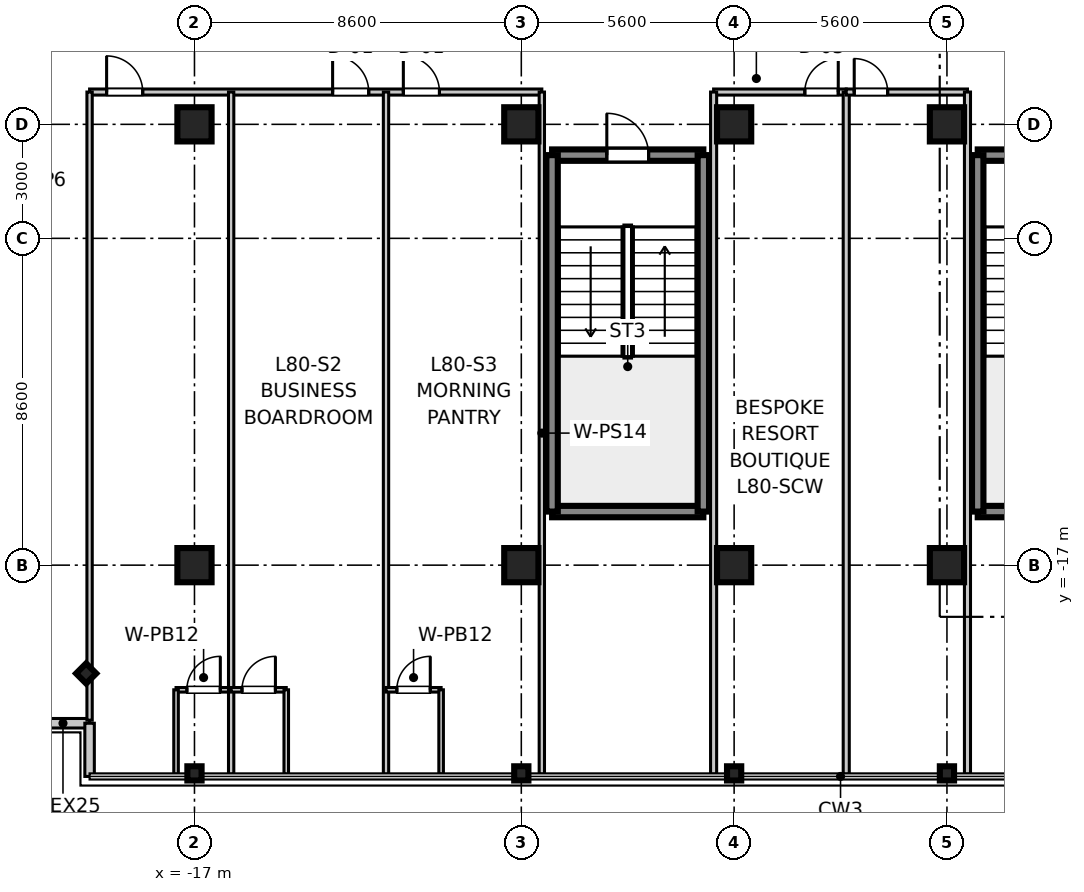
"""IFC4 building model, lengths in metres.
Left out: names, types, materials, properties, quantities, classifications, styles, units other than length and angle.
Written with IfcOpenShell. Run it as: python <this file> out.ifc"""

import sys

from ifc_helpers import new_model, si_unit, direction, frame, frame_2d, origin, origin_2d, place, context, subcontext, project, spatial, rectangle, i_section, extrude, source, transform, mapped, element, fill, save


model = new_model("IFC4")
c1 = context("Model", 3, precision=1e-05, world=origin(), true_north=direction((0.0, 1.0)))
c2 = subcontext(c1, "Body", "Model", "MODEL_VIEW")
j1 = project(units=[si_unit("LENGTHUNIT", "METRE"), si_unit("PLANEANGLEUNIT", "RADIAN")], contexts=[c1])
p1 = place(None, origin())
s1 = spatial("IfcSite", under=j1, at=p1, CompositionType="ELEMENT")
p2 = place(p1, origin())
s2 = spatial("IfcBuilding", under=s1, at=p2, CompositionType="ELEMENT")
p3 = place(p2, frame((0.0, 0.0, 311.9)))
s3 = spatial("IfcBuildingStorey", under=s2, at=p3, CompositionType="ELEMENT", Elevation=311.9)
m1 = source(origin(), c2, "Body", "SweptSolid", [
    extrude(rectangle(XDim=0.9, YDim=0.9, at=origin_2d()), origin(), (0.0, 0.0, 1.0), 3.805),
])
for number, where, z_axis, x_axis in (
    (1, (-17.0, -17.0, 0.0), (0.0, 0.0, 1.0), (1.0, 0.0, 0.0)),
    (2, (-17.0, -5.4, 0.0), (0.0, 0.0, 1.0), (1.0, 0.0, 0.0)),
    (3, (-8.4, -17.0, 0.0), (0.0, 0.0, 1.0), (1.0, 0.0, 0.0)),
    (4, (-8.4, -5.4, 0.0), (0.0, 0.0, 1.0), (1.0, 0.0, 0.0)),
    (5, (-2.8, -17.0, 0.0), (0.0, 0.0, 1.0), (1.0, 0.0, 0.0)),
    (6, (-2.8, -5.4, 0.0), (0.0, 0.0, 1.0), (1.0, 0.0, 0.0)),
    (7, (2.8, -17.0, 0.0), (0.0, 0.0, 1.0), (1.0, 0.0, 0.0)),
    (8, (2.8, -5.4, 0.0), (0.0, 0.0, 1.0), (1.0, 0.0, 0.0)),
):
    element("IfcColumn", number, at=place(p3, frame(where, z_axis=z_axis, x_axis=x_axis)), inside=s3, PredefinedType="COLUMN", context=c2, shape_type="MappedRepresentation", body=[
        mapped(m1, transform((0.0, 0.0, 0.0), scale=1.0)),
    ])
m2 = source(origin(), c2, "Body", "SweptSolid", [
    extrude(i_section(OverallWidth=0.374, OverallDepth=0.374, WebThickness=0.014, FlangeThickness=0.023, at=origin_2d()), origin(), (0.0, 0.0, 1.0), 3.805),
])
for number, where, z_axis, x_axis in (
    (9, (-17.0, -22.48, 0.0), (0.0, 0.0, 1.0), (0.0, 1.0, 0.0)),
    (10, (-8.4, -22.48, 0.0), (0.0, 0.0, 1.0), (0.0, 1.0, 0.0)),
    (11, (-2.8, -22.48, 0.0), (0.0, 0.0, 1.0), (0.0, 1.0, 0.0)),
    (12, (2.8, -22.48, 0.0), (0.0, 0.0, 1.0), (0.0, 1.0, 0.0)),
    (13, (-19.85, -19.85, 0.0), (0.0, 0.0, 1.0), (0.707, 0.707, 0.0)),
):
    element("IfcColumn", number, at=place(p3, frame(where, z_axis=z_axis, x_axis=x_axis)), inside=s3, PredefinedType="COLUMN", context=c2, shape_type="MappedRepresentation", body=[
        mapped(m2, transform((0.0, 0.0, 0.0), scale=1.0)),
    ])
m3 = source(origin(), c2, "Body", "SweptSolid", [
    extrude(rectangle(XDim=3.98, YDim=0.3, at=frame_2d((1.99, 0.0))), origin(), (0.0, 0.0, 1.0), 3.55),
])
for number, where, z_axis, x_axis in (
    (14, (3.61, -15.59, 0.0), (0.0, 0.0, 1.0), (1.0, 0.0, 0.0)),
    (15, (3.61, -6.21, 0.0), (0.0, 0.0, 1.0), (1.0, 0.0, 0.0)),
):
    element("IfcWall", number, at=place(p3, frame(where, z_axis=z_axis, x_axis=x_axis)), inside=s3, PredefinedType="SHEAR", context=c2, shape_type="MappedRepresentation", body=[
        mapped(m3, transform((0.0, 0.0, 0.0), scale=1.0)),
    ])
m4 = source(origin(), c2, "Body", "SweptSolid", [
    extrude(rectangle(XDim=9.38, YDim=0.3, at=frame_2d((4.69, 0.0))), origin(), (0.0, 0.0, 1.0), 3.55),
])
p4 = place(p3, frame((3.61, -15.59, 0.0), z_axis=(0.0, 0.0, 1.0), x_axis=(0.0, 1.0, 0.0)))
e16 = element("IfcWall", 16, at=p4, inside=s3, PredefinedType="SHEAR", context=c2, shape_type="MappedRepresentation", body=[
    mapped(m4, transform((0.0, 0.0, 0.0), scale=1.0)),
])
p5 = place(p3, frame((-7.59, -15.59, 0.0), z_axis=(0.0, 0.0, 1.0), x_axis=(1.0, 0.0, 0.0)))
e17 = element("IfcWall", 17, at=p5, inside=s3, PredefinedType="SHEAR", context=c2, shape_type="MappedRepresentation", body=[
    mapped(m3, transform((0.0, 0.0, 0.0), scale=1.0)),
])
p6 = place(p3, frame((-7.59, -6.21, 0.0), z_axis=(0.0, 0.0, 1.0), x_axis=(1.0, 0.0, 0.0)))
e18 = element("IfcWall", 18, at=p6, inside=s3, PredefinedType="SHEAR", context=c2, shape_type="MappedRepresentation", body=[
    mapped(m3, transform((0.0, 0.0, 0.0), scale=1.0)),
])
p7 = place(p6, frame((1.44, 0.0, 0.0)))
e19 = element("IfcOpeningElement", 19, at=p7, cuts=e18, PredefinedType="OPENING", context=c2, shape_type="SweptSolid", body=[
    extrude(rectangle(XDim=1.1, YDim=2.15, at=frame_2d((0.55, 1.075))), frame((0.0, 0.16, 0.0), z_axis=(0.0, -1.0, 0.0), x_axis=(1.0, 0.0, 0.0)), (0.0, 0.0, 1.0), 0.32),
])
for number, where, z_axis, x_axis in (
    (20, (-7.59, -15.59, 0.0), (0.0, 0.0, 1.0), (0.0, 1.0, 0.0)),
    (21, (-3.61, -15.59, 0.0), (0.0, 0.0, 1.0), (0.0, 1.0, 0.0)),
):
    element("IfcWall", number, at=place(p3, frame(where, z_axis=z_axis, x_axis=x_axis)), inside=s3, PredefinedType="SHEAR", context=c2, shape_type="MappedRepresentation", body=[
        mapped(m4, transform((0.0, 0.0, 0.0), scale=1.0)),
    ])
m5 = source(origin(), c2, "Body", "SweptSolid", [
    extrude(rectangle(XDim=1.4, YDim=0.25, at=frame_2d((0.7, 0.0))), origin(), (0.0, 0.0, 1.0), 3.55),
])
p8 = place(p3, frame((-21.16, -21.16, 0.0), z_axis=(0.0, 0.0, 1.0), x_axis=(1.0, 0.0, 0.0)))
e22 = element("IfcWall", 22, at=p8, inside=s3, PredefinedType="STANDARD", context=c2, shape_type="MappedRepresentation", body=[
    mapped(m5, transform((0.0, 0.0, 0.0), scale=1.0)),
])
m6 = source(origin(), c2, "Body", "SweptSolid", [
    extrude(rectangle(XDim=1.4, YDim=0.25, at=frame_2d((0.7, 0.0))), origin(), (0.0, 0.0, 1.0), 3.55),
])
p9 = place(p3, frame((-19.76, -22.56, 0.0), z_axis=(0.0, 0.0, 1.0), x_axis=(0.0, 1.0, 0.0)))
e23 = element("IfcWall", 23, at=p9, inside=s3, PredefinedType="STANDARD", context=c2, shape_type="MappedRepresentation", body=[
    mapped(m6, transform((0.0, 0.0, 0.0), scale=1.0)),
])
m7 = source(origin(), c2, "Body", "SweptSolid", [
    extrude(rectangle(XDim=11.9, YDim=0.16, at=frame_2d((5.95, 0.0))), origin(), (0.0, 0.0, 1.0), 2.89),
])
p10 = place(p3, frame((-19.76, -4.55, 0.0), z_axis=(0.0, 0.0, 1.0), x_axis=(1.0, 0.0, 0.0)))
e24 = element("IfcWall", 24, at=p10, inside=s3, PredefinedType="PARTITIONING", context=c2, shape_type="MappedRepresentation", body=[
    mapped(m7, transform((0.0, 0.0, 0.0), scale=1.0)),
])
p11 = place(p10, frame((0.448, 0.0, 0.0)))
e25 = element("IfcOpeningElement", 25, at=p11, cuts=e24, PredefinedType="OPENING", context=c2, shape_type="SweptSolid", body=[
    extrude(rectangle(XDim=0.95, YDim=2.1, at=frame_2d((0.475, 1.05))), frame((0.0, 0.09, 0.0), z_axis=(0.0, -1.0, 0.0), x_axis=(1.0, 0.0, 0.0)), (0.0, 0.0, 1.0), 0.18),
])
p12 = place(p10, frame((6.395, 0.0, 0.0)))
e26 = element("IfcOpeningElement", 26, at=p12, cuts=e24, PredefinedType="OPENING", context=c2, shape_type="SweptSolid", body=[
    extrude(rectangle(XDim=0.95, YDim=2.1, at=frame_2d((0.475, 1.05))), frame((0.0, 0.09, 0.0), z_axis=(0.0, -1.0, 0.0), x_axis=(1.0, 0.0, 0.0)), (0.0, 0.0, 1.0), 0.18),
])
p13 = place(p10, frame((8.256, 0.0, 0.0)))
e27 = element("IfcOpeningElement", 27, at=p13, cuts=e24, PredefinedType="OPENING", context=c2, shape_type="SweptSolid", body=[
    extrude(rectangle(XDim=0.95, YDim=2.1, at=frame_2d((0.475, 1.05))), frame((0.0, 0.09, 0.0), z_axis=(0.0, -1.0, 0.0), x_axis=(1.0, 0.0, 0.0)), (0.0, 0.0, 1.0), 0.18),
])
m8 = source(origin(), c2, "Body", "SweptSolid", [
    extrude(rectangle(XDim=16.53, YDim=0.14, at=frame_2d((8.265, 0.0))), origin(), (0.0, 0.0, 1.0), 2.89),
])
p14 = place(p3, frame((-19.76, -21.08, 0.0), z_axis=(0.0, 0.0, 1.0), x_axis=(0.0, 1.0, 0.0)))
e28 = element("IfcWall", 28, at=p14, inside=s3, PredefinedType="PARTITIONING", context=c2, shape_type="MappedRepresentation", body=[
    mapped(m8, transform((0.0, 0.0, 0.0), scale=1.0)),
])
m9 = source(origin(), c2, "Body", "SweptSolid", [
    extrude(rectangle(XDim=17.95, YDim=0.14, at=frame_2d((8.975, 0.0))), origin(), (0.0, 0.0, 1.0), 2.89),
])
p15 = place(p3, frame((-7.86, -22.5, 0.0), z_axis=(0.0, 0.0, 1.0), x_axis=(0.0, 1.0, 0.0)))
e29 = element("IfcWall", 29, at=p15, inside=s3, PredefinedType="PARTITIONING", context=c2, shape_type="MappedRepresentation", body=[
    mapped(m9, transform((0.0, 0.0, 0.0), scale=1.0)),
])
m10 = source(origin(), c2, "Body", "SweptSolid", [
    extrude(rectangle(XDim=1.45, YDim=0.12, at=frame_2d((0.725, 0.0))), origin(), (0.0, 0.0, 1.0), 2.89),
])
p16 = place(p3, frame((-17.485, -20.28, 0.0), z_axis=(0.0, 0.0, 1.0), x_axis=(1.0, 0.0, 0.0)))
e30 = element("IfcWall", 30, at=p16, inside=s3, PredefinedType="PARTITIONING", context=c2, shape_type="MappedRepresentation", body=[
    mapped(m10, transform((0.0, 0.0, 0.0), scale=1.0)),
])
p17 = place(p16, frame((0.285, 0.0, 0.0)))
e31 = element("IfcOpeningElement", 31, at=p17, cuts=e30, PredefinedType="OPENING", context=c2, shape_type="SweptSolid", body=[
    extrude(rectangle(XDim=0.88, YDim=2.1, at=frame_2d((0.44, 1.05))), frame((0.0, 0.07, 0.0), z_axis=(0.0, -1.0, 0.0), x_axis=(1.0, 0.0, 0.0)), (0.0, 0.0, 1.0), 0.14),
])
m11 = source(origin(), c2, "Body", "SweptSolid", [
    extrude(rectangle(XDim=2.22, YDim=0.12, at=frame_2d((1.11, 0.0))), origin(), (0.0, 0.0, 1.0), 2.89),
])
p18 = place(p3, frame((-17.485, -22.5, 0.0), z_axis=(0.0, 0.0, 1.0), x_axis=(0.0, 1.0, 0.0)))
e32 = element("IfcWall", 32, at=p18, inside=s3, PredefinedType="PARTITIONING", context=c2, shape_type="MappedRepresentation", body=[
    mapped(m11, transform((0.0, 0.0, 0.0), scale=1.0)),
])
p19 = place(p3, frame((-16.035, -22.5, 0.0), z_axis=(0.0, 0.0, 1.0), x_axis=(0.0, 1.0, 0.0)))
e33 = element("IfcWall", 33, at=p19, inside=s3, PredefinedType="PARTITIONING", context=c2, shape_type="MappedRepresentation", body=[
    mapped(m9, transform((0.0, 0.0, 0.0), scale=1.0)),
])
m12 = source(origin(), c2, "Body", "SweptSolid", [
    extrude(rectangle(XDim=1.45, YDim=0.12, at=frame_2d((0.725, 0.0))), origin(), (0.0, 0.0, 1.0), 2.89),
])
p20 = place(p3, frame((-16.035, -20.28, 0.0), z_axis=(0.0, 0.0, 1.0), x_axis=(1.0, 0.0, 0.0)))
e34 = element("IfcWall", 34, at=p20, inside=s3, PredefinedType="PARTITIONING", context=c2, shape_type="MappedRepresentation", body=[
    mapped(m12, transform((0.0, 0.0, 0.0), scale=1.0)),
])
p21 = place(p20, frame((0.285, 0.0, 0.0)))
e35 = element("IfcOpeningElement", 35, at=p21, cuts=e34, PredefinedType="OPENING", context=c2, shape_type="SweptSolid", body=[
    extrude(rectangle(XDim=0.88, YDim=2.1, at=frame_2d((0.44, 1.05))), frame((0.0, 0.07, 0.0), z_axis=(0.0, -1.0, 0.0), x_axis=(1.0, 0.0, 0.0)), (0.0, 0.0, 1.0), 0.14),
])
p22 = place(p3, frame((-14.585, -22.5, 0.0), z_axis=(0.0, 0.0, 1.0), x_axis=(0.0, 1.0, 0.0)))
e36 = element("IfcWall", 36, at=p22, inside=s3, PredefinedType="PARTITIONING", context=c2, shape_type="MappedRepresentation", body=[
    mapped(m11, transform((0.0, 0.0, 0.0), scale=1.0)),
])
p23 = place(p3, frame((-11.96, -22.5, 0.0), z_axis=(0.0, 0.0, 1.0), x_axis=(0.0, 1.0, 0.0)))
e37 = element("IfcWall", 37, at=p23, inside=s3, PredefinedType="PARTITIONING", context=c2, shape_type="MappedRepresentation", body=[
    mapped(m9, transform((0.0, 0.0, 0.0), scale=1.0)),
])
p24 = place(p3, frame((-11.96, -20.28, 0.0), z_axis=(0.0, 0.0, 1.0), x_axis=(1.0, 0.0, 0.0)))
e38 = element("IfcWall", 38, at=p24, inside=s3, PredefinedType="PARTITIONING", context=c2, shape_type="MappedRepresentation", body=[
    mapped(m12, transform((0.0, 0.0, 0.0), scale=1.0)),
])
p25 = place(p24, frame((0.285, 0.0, 0.0)))
e39 = element("IfcOpeningElement", 39, at=p25, cuts=e38, PredefinedType="OPENING", context=c2, shape_type="SweptSolid", body=[
    extrude(rectangle(XDim=0.88, YDim=2.1, at=frame_2d((0.44, 1.05))), frame((0.0, 0.07, 0.0), z_axis=(0.0, -1.0, 0.0), x_axis=(1.0, 0.0, 0.0)), (0.0, 0.0, 1.0), 0.14),
])
p26 = place(p3, frame((-10.51, -22.5, 0.0), z_axis=(0.0, 0.0, 1.0), x_axis=(0.0, 1.0, 0.0)))
e40 = element("IfcWall", 40, at=p26, inside=s3, PredefinedType="PARTITIONING", context=c2, shape_type="MappedRepresentation", body=[
    mapped(m11, transform((0.0, 0.0, 0.0), scale=1.0)),
])
m13 = source(origin(), c2, "Body", "SweptSolid", [
    extrude(rectangle(XDim=3.49, YDim=0.16, at=frame_2d((1.745, 0.0))), origin(), (0.0, 0.0, 1.0), 2.89),
])
p27 = place(p3, frame((-3.34, -4.55, 0.0), z_axis=(0.0, 0.0, 1.0), x_axis=(1.0, 0.0, 0.0)))
e41 = element("IfcWall", 41, at=p27, inside=s3, PredefinedType="PARTITIONING", context=c2, shape_type="MappedRepresentation", body=[
    mapped(m13, transform((0.0, 0.0, 0.0), scale=1.0)),
])
p28 = place(p27, frame((2.4, 0.0, 0.0)))
e42 = element("IfcOpeningElement", 42, at=p28, cuts=e41, PredefinedType="OPENING", context=c2, shape_type="SweptSolid", body=[
    extrude(rectangle(XDim=0.88, YDim=2.1, at=frame_2d((0.44, 1.05))), frame((0.0, 0.09, 0.0), z_axis=(0.0, -1.0, 0.0), x_axis=(1.0, 0.0, 0.0)), (0.0, 0.0, 1.0), 0.18),
])
m14 = source(origin(), c2, "Body", "SweptSolid", [
    extrude(rectangle(XDim=17.95, YDim=0.16, at=frame_2d((8.975, 0.0))), origin(), (0.0, 0.0, 1.0), 2.89),
])
for number, where, z_axis, x_axis in (
    (43, (-3.34, -22.5, 0.0), (0.0, 0.0, 1.0), (0.0, 1.0, 0.0)),
    (44, (0.15, -22.5, 0.0), (0.0, 0.0, 1.0), (0.0, 1.0, 0.0)),
):
    element("IfcWall", number, at=place(p3, frame(where, z_axis=z_axis, x_axis=x_axis)), inside=s3, PredefinedType="PARTITIONING", context=c2, shape_type="MappedRepresentation", body=[
        mapped(m14, transform((0.0, 0.0, 0.0), scale=1.0)),
    ])
m15 = source(origin(), c2, "Body", "SweptSolid", [
    extrude(rectangle(XDim=3.19, YDim=0.16, at=frame_2d((1.595, 0.0))), origin(), (0.0, 0.0, 1.0), 2.89),
])
p29 = place(p3, frame((0.15, -4.55, 0.0), z_axis=(0.0, 0.0, 1.0), x_axis=(1.0, 0.0, 0.0)))
e45 = element("IfcWall", 45, at=p29, inside=s3, PredefinedType="PARTITIONING", context=c2, shape_type="MappedRepresentation", body=[
    mapped(m15, transform((0.0, 0.0, 0.0), scale=1.0)),
])
p30 = place(p29, frame((0.21, 0.0, 0.0)))
e46 = element("IfcOpeningElement", 46, at=p30, cuts=e45, PredefinedType="OPENING", context=c2, shape_type="SweptSolid", body=[
    extrude(rectangle(XDim=0.88, YDim=2.1, at=frame_2d((0.44, 1.05))), frame((0.0, 0.09, 0.0), z_axis=(0.0, -1.0, 0.0), x_axis=(1.0, 0.0, 0.0)), (0.0, 0.0, 1.0), 0.18),
])
p31 = place(p3, frame((3.34, -22.5, 0.0), z_axis=(0.0, 0.0, 1.0), x_axis=(0.0, 1.0, 0.0)))
e47 = element("IfcWall", 47, at=p31, inside=s3, PredefinedType="PARTITIONING", context=c2, shape_type="MappedRepresentation", body=[
    mapped(m14, transform((0.0, 0.0, 0.0), scale=1.0)),
])
m16 = source(origin(), c2, "Body", "SweptSolid", [
    extrude(rectangle(XDim=1.1, YDim=2.15, at=frame_2d((0.55, 1.075))), frame((0.0, 0.025, 0.0), z_axis=(0.0, -1.0, 0.0), x_axis=(1.0, 0.0, 0.0)), (0.0, 0.0, 1.0), 0.05),
])
p32 = place(p7, frame((1.1, 0.0, 0.0), z_axis=(0.0, 0.0, 1.0), x_axis=(-1.0, 0.0, 0.0)))
e48 = element("IfcDoor", 48, at=p32, inside=s3, OperationType="SINGLE_SWING_LEFT", PredefinedType="DOOR", context=c2, shape_type="MappedRepresentation", body=[
    mapped(m16, transform((0.0, 0.0, 0.0), scale=1.0)),
])
fill(e19, e48)
m17 = source(origin(), c2, "Body", "SweptSolid", [
    extrude(rectangle(XDim=0.88, YDim=2.1, at=frame_2d((0.44, 1.05))), frame((0.0, 0.025, 0.0), z_axis=(0.0, -1.0, 0.0), x_axis=(1.0, 0.0, 0.0)), (0.0, 0.0, 1.0), 0.05),
])
p33 = place(p17, frame((0.88, 0.0, 0.0), z_axis=(0.0, 0.0, 1.0), x_axis=(-1.0, 0.0, 0.0)))
e49 = element("IfcDoor", 49, at=p33, inside=s3, OperationType="SINGLE_SWING_RIGHT", PredefinedType="DOOR", context=c2, shape_type="MappedRepresentation", body=[
    mapped(m17, transform((0.0, 0.0, 0.0), scale=1.0)),
])
fill(e31, e49)
m18 = source(origin(), c2, "Body", "SweptSolid", [
    extrude(rectangle(XDim=0.95, YDim=2.1, at=frame_2d((0.475, 1.05))), frame((0.0, 0.025, 0.0), z_axis=(0.0, -1.0, 0.0), x_axis=(1.0, 0.0, 0.0)), (0.0, 0.0, 1.0), 0.05),
])
p34 = place(p11, frame((0.95, 0.0, 0.0), z_axis=(0.0, 0.0, 1.0), x_axis=(-1.0, 0.0, 0.0)))
e50 = element("IfcDoor", 50, at=p34, inside=s3, OperationType="SINGLE_SWING_LEFT", PredefinedType="DOOR", context=c2, shape_type="MappedRepresentation", body=[
    mapped(m18, transform((0.0, 0.0, 0.0), scale=1.0)),
])
fill(e25, e50)
p35 = place(p21, frame((0.88, 0.0, 0.0), z_axis=(0.0, 0.0, 1.0), x_axis=(-1.0, 0.0, 0.0)))
e51 = element("IfcDoor", 51, at=p35, inside=s3, OperationType="SINGLE_SWING_RIGHT", PredefinedType="DOOR", context=c2, shape_type="MappedRepresentation", body=[
    mapped(m17, transform((0.0, 0.0, 0.0), scale=1.0)),
])
fill(e35, e51)
p36 = place(p12, frame((0.95, 0.0, 0.0), z_axis=(0.0, 0.0, 1.0), x_axis=(-1.0, 0.0, 0.0)))
e52 = element("IfcDoor", 52, at=p36, inside=s3, OperationType="SINGLE_SWING_LEFT", PredefinedType="DOOR", context=c2, shape_type="MappedRepresentation", body=[
    mapped(m18, transform((0.0, 0.0, 0.0), scale=1.0)),
])
fill(e26, e52)
p37 = place(p25, frame((0.88, 0.0, 0.0), z_axis=(0.0, 0.0, 1.0), x_axis=(-1.0, 0.0, 0.0)))
e53 = element("IfcDoor", 53, at=p37, inside=s3, OperationType="SINGLE_SWING_RIGHT", PredefinedType="DOOR", context=c2, shape_type="MappedRepresentation", body=[
    mapped(m17, transform((0.0, 0.0, 0.0), scale=1.0)),
])
fill(e39, e53)
p38 = place(p13, frame((0.95, 0.0, 0.0), z_axis=(0.0, 0.0, 1.0), x_axis=(-1.0, 0.0, 0.0)))
e54 = element("IfcDoor", 54, at=p38, inside=s3, OperationType="SINGLE_SWING_LEFT", PredefinedType="DOOR", context=c2, shape_type="MappedRepresentation", body=[
    mapped(m18, transform((0.0, 0.0, 0.0), scale=1.0)),
])
fill(e27, e54)
p39 = place(p28, frame((0.88, 0.0, 0.0), z_axis=(0.0, 0.0, 1.0), x_axis=(-1.0, 0.0, 0.0)))
e55 = element("IfcDoor", 55, at=p39, inside=s3, OperationType="SINGLE_SWING_RIGHT", PredefinedType="DOOR", context=c2, shape_type="MappedRepresentation", body=[
    mapped(m17, transform((0.0, 0.0, 0.0), scale=1.0)),
])
fill(e42, e55)
p40 = place(p30, frame((0.88, 0.0, 0.0), z_axis=(0.0, 0.0, 1.0), x_axis=(-1.0, 0.0, 0.0)))
e56 = element("IfcDoor", 56, at=p40, inside=s3, OperationType="SINGLE_SWING_LEFT", PredefinedType="DOOR", context=c2, shape_type="MappedRepresentation", body=[
    mapped(m17, transform((0.0, 0.0, 0.0), scale=1.0)),
])
fill(e46, e56)
save(model, sys.argv[1])
